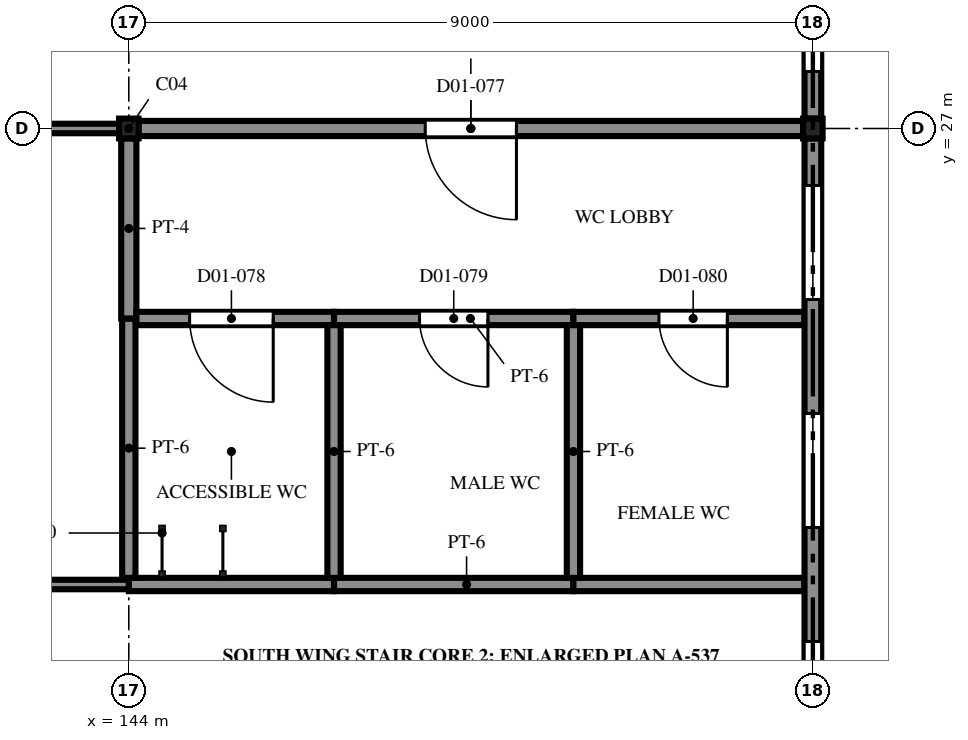
"""IFC4 building model, lengths in metres.
Left out: names, types, materials, properties, quantities, classifications, styles, units other than length and angle.
Written with IfcOpenShell. Run it as: python <this file> out.ifc"""

import sys

from ifc_helpers import new_model, si_unit, direction, frame, frame_2d, origin, origin_2d, place, context, subcontext, project, spatial, polyline, rectangle, i_section, outline, extrude, element, fill, save


model = new_model("IFC4")
c1 = context("Model", 3, precision=1e-05, world=origin(), true_north=direction((0.0, 1.0)))
c2 = subcontext(c1, "Body", "Model", "MODEL_VIEW")
j1 = project(units=[si_unit("LENGTHUNIT", "METRE"), si_unit("PLANEANGLEUNIT", "RADIAN")], contexts=[c1])
p1 = place(None, origin())
s1 = spatial("IfcSite", under=j1, at=p1, CompositionType="ELEMENT")
p2 = place(p1, origin())
s2 = spatial("IfcBuilding", under=s1, at=p2, CompositionType="ELEMENT")
p3 = place(p2, frame((0.0, 0.0, 7.5)))
s3 = spatial("IfcBuildingStorey", under=s2, at=p3, CompositionType="ELEMENT", Elevation=7.5)
for number, where, z_axis, x_axis in (
    (1, (144.0, 27.0, 0.0), (0.0, 0.0, 1.0), (1.0, 0.0, 0.0)),
    (2, (153.0, 27.0, 0.0), (0.0, 0.0, 1.0), (1.0, 0.0, 0.0)),
):
    element("IfcColumn", number, at=place(p3, frame(where, z_axis=z_axis, x_axis=x_axis)), inside=s3, PredefinedType="COLUMN", context=c2, shape_type="SweptSolid", body=[
        extrude(i_section(OverallWidth=0.256, OverallDepth=0.26, WebThickness=0.01, FlangeThickness=0.017, FilletRadius=0.013, at=origin_2d()), origin(), (0.0, 0.0, 1.0), 4.2),
    ])
p4 = place(p3, frame((153.0, 18.13, 0.0), z_axis=(0.0, 0.0, 1.0), x_axis=(0.0, 1.0, 0.0)))
e3 = element("IfcWall", 3, at=p4, inside=s3, PredefinedType="SOLIDWALL", context=c2, shape_type="SweptSolid", body=[
    extrude(rectangle(XDim=8.74, YDim=0.22, at=frame_2d((4.37, 0.0))), origin(), (0.0, 0.0, 1.0), 3.597),
])
p5 = place(p4, frame((0.62, 0.0, 0.9)))
e4 = element("IfcOpeningElement", 4, at=p5, cuts=e3, PredefinedType="OPENING", context=c2, shape_type="SweptSolid", body=[
    extrude(rectangle(XDim=1.5, YDim=2.4, at=frame_2d((0.75, 1.2))), frame((0.0, 0.12, 0.0), z_axis=(0.0, -1.0, 0.0), x_axis=(1.0, 0.0, 0.0)), (0.0, 0.0, 1.0), 0.24),
])
p6 = place(p4, frame((3.62, 0.0, 0.9)))
e5 = element("IfcOpeningElement", 5, at=p6, cuts=e3, PredefinedType="OPENING", context=c2, shape_type="SweptSolid", body=[
    extrude(rectangle(XDim=1.5, YDim=2.4, at=frame_2d((0.75, 1.2))), frame((0.0, 0.12, 0.0), z_axis=(0.0, -1.0, 0.0), x_axis=(1.0, 0.0, 0.0)), (0.0, 0.0, 1.0), 0.24),
])
p7 = place(p4, frame((6.62, 0.0, 0.9)))
e6 = element("IfcOpeningElement", 6, at=p7, cuts=e3, PredefinedType="OPENING", context=c2, shape_type="SweptSolid", body=[
    extrude(rectangle(XDim=1.5, YDim=2.4, at=frame_2d((0.75, 1.2))), frame((0.0, 0.12, 0.0), z_axis=(0.0, -1.0, 0.0), x_axis=(1.0, 0.0, 0.0)), (0.0, 0.0, 1.0), 0.24),
])
p8 = place(p3, frame((153.0, 27.13, 0.0), z_axis=(0.0, 0.0, 1.0), x_axis=(0.0, 1.0, 0.0)))
e7 = element("IfcWall", 7, at=p8, inside=s3, PredefinedType="SOLIDWALL", context=c2, shape_type="SweptSolid", body=[
    extrude(rectangle(XDim=8.616, YDim=0.22, at=frame_2d((4.308, 0.0))), origin(), (0.0, 0.0, 1.0), 3.597),
])
p9 = place(p8, frame((0.62, 0.0, 0.9)))
e8 = element("IfcOpeningElement", 8, at=p9, cuts=e7, PredefinedType="OPENING", context=c2, shape_type="SweptSolid", body=[
    extrude(rectangle(XDim=1.5, YDim=2.4, at=frame_2d((0.75, 1.2))), frame((0.0, 0.12, 0.0), z_axis=(0.0, -1.0, 0.0), x_axis=(1.0, 0.0, 0.0)), (0.0, 0.0, 1.0), 0.24),
])
p10 = place(p8, frame((3.62, 0.0, 0.9)))
e9 = element("IfcOpeningElement", 9, at=p10, cuts=e7, PredefinedType="OPENING", context=c2, shape_type="SweptSolid", body=[
    extrude(rectangle(XDim=1.5, YDim=2.4, at=frame_2d((0.75, 1.2))), frame((0.0, 0.12, 0.0), z_axis=(0.0, -1.0, 0.0), x_axis=(1.0, 0.0, 0.0)), (0.0, 0.0, 1.0), 0.24),
])
p11 = place(p8, frame((6.62, 0.0, 0.9)))
e10 = element("IfcOpeningElement", 10, at=p11, cuts=e7, PredefinedType="OPENING", context=c2, shape_type="SweptSolid", body=[
    extrude(rectangle(XDim=1.5, YDim=2.4, at=frame_2d((0.75, 1.2))), frame((0.0, 0.12, 0.0), z_axis=(0.0, -1.0, 0.0), x_axis=(1.0, 0.0, 0.0)), (0.0, 0.0, 1.0), 0.24),
])
p12 = place(p3, frame((144.0, 21.0, 0.0), z_axis=(0.0, 0.0, 1.0), x_axis=(1.0, 0.0, 0.0)))
e11 = element("IfcWall", 11, at=p12, inside=s3, PredefinedType="PARTITIONING", context=c2, shape_type="SweptSolid", body=[
    extrude(rectangle(XDim=2.7, YDim=0.175, at=frame_2d((1.35, 0.0))), origin(), (0.0, 0.0, 1.0), 3.307),
])
p13 = place(p3, frame((135.0, 21.0, 0.0), z_axis=(0.0, 0.0, 1.0), x_axis=(1.0, 0.0, 0.0)))
e12 = element("IfcWall", 12, at=p13, inside=s3, PredefinedType="PARTITIONING", context=c2, shape_type="SweptSolid", body=[
    extrude(rectangle(XDim=9.0, YDim=0.125, at=frame_2d((4.5, 0.0))), origin(), (0.0, 0.0, 1.0), 3.307),
])
p14 = place(p3, frame((146.7, 21.0, 0.0), z_axis=(0.0, 0.0, 1.0), x_axis=(1.0, 0.0, 0.0)))
e13 = element("IfcWall", 13, at=p14, inside=s3, PredefinedType="PARTITIONING", context=c2, shape_type="SweptSolid", body=[
    extrude(rectangle(XDim=3.15, YDim=0.175, at=frame_2d((1.575, 0.0))), origin(), (0.0, 0.0, 1.0), 3.307),
])
p15 = place(p3, frame((149.85, 21.0, 0.0), z_axis=(0.0, 0.0, 1.0), x_axis=(1.0, 0.0, 0.0)))
e14 = element("IfcWall", 14, at=p15, inside=s3, PredefinedType="PARTITIONING", context=c2, shape_type="SweptSolid", body=[
    extrude(rectangle(XDim=3.038, YDim=0.175, at=frame_2d((1.519, 0.0))), origin(), (0.0, 0.0, 1.0), 3.307),
])
p16 = place(p3, frame((143.872, 27.0, 0.0), z_axis=(0.0, 0.0, 1.0), x_axis=(-1.0, 0.0, 0.0)))
e15 = element("IfcWall", 15, at=p16, inside=s3, PredefinedType="PARTITIONING", context=c2, shape_type="SweptSolid", body=[
    extrude(rectangle(XDim=8.744, YDim=0.125, at=frame_2d((4.372, 0.0))), origin(), (0.0, 0.0, 1.0), 3.307),
])
p17 = place(p16, frame((3.772, 0.0, 0.0)))
e16 = element("IfcOpeningElement", 16, at=p17, cuts=e15, PredefinedType="OPENING", context=c2, shape_type="SweptSolid", body=[
    extrude(rectangle(XDim=1.2, YDim=2.1, at=frame_2d((0.6, 1.05))), frame((0.0, 0.073, 0.0), z_axis=(0.0, -1.0, 0.0), x_axis=(1.0, 0.0, 0.0)), (0.0, 0.0, 1.0), 0.145),
])
p18 = place(p3, frame((152.872, 27.0, 0.0), z_axis=(0.0, 0.0, 1.0), x_axis=(-1.0, 0.0, 0.0)))
e17 = element("IfcWall", 17, at=p18, inside=s3, PredefinedType="PARTITIONING", context=c2, shape_type="SweptSolid", body=[
    extrude(rectangle(XDim=8.744, YDim=0.2, at=frame_2d((4.372, 0.0))), origin(), (0.0, 0.0, 1.0), 3.382),
])
p19 = place(p18, frame((3.772, 0.0, 0.0)))
e18 = element("IfcOpeningElement", 18, at=p19, cuts=e17, PredefinedType="OPENING", context=c2, shape_type="SweptSolid", body=[
    extrude(rectangle(XDim=1.2, YDim=2.1, at=frame_2d((0.6, 1.05))), frame((0.0, 0.11, 0.0), z_axis=(0.0, -1.0, 0.0), x_axis=(1.0, 0.0, 0.0)), (0.0, 0.0, 1.0), 0.22),
])
p20 = place(p3, frame((144.0, 24.5, 0.0), z_axis=(0.0, 0.0, 1.0), x_axis=(0.0, -1.0, 0.0)))
e19 = element("IfcWall", 19, at=p20, inside=s3, PredefinedType="PARTITIONING", context=c2, shape_type="SweptSolid", body=[
    extrude(rectangle(XDim=3.413, YDim=0.175, at=frame_2d((1.706, 0.0))), origin(), (0.0, 0.0, 1.0), 3.307),
])
p21 = place(p3, frame((144.0, 26.87, 0.0), z_axis=(0.0, 0.0, 1.0), x_axis=(0.0, -1.0, 0.0)))
e20 = element("IfcWall", 20, at=p21, inside=s3, PredefinedType="PARTITIONING", context=c2, shape_type="SweptSolid", body=[
    extrude(rectangle(XDim=2.37, YDim=0.2, at=frame_2d((1.185, 0.0))), origin(), (0.0, 0.0, 1.0), 3.382),
])
p22 = place(p3, frame((146.7, 24.5, 0.0), z_axis=(0.0, 0.0, 1.0), x_axis=(-1.0, 0.0, 0.0)))
e21 = element("IfcWall", 21, at=p22, inside=s3, PredefinedType="PARTITIONING", context=c2, shape_type="SweptSolid", body=[
    extrude(rectangle(XDim=2.6, YDim=0.175, at=frame_2d((1.3, 0.0))), origin(), (0.0, 0.0, 1.0), 3.307),
])
p23 = place(p22, frame((0.8, 0.0, 0.0)))
e22 = element("IfcOpeningElement", 22, at=p23, cuts=e21, PredefinedType="OPENING", context=c2, shape_type="SweptSolid", body=[
    extrude(rectangle(XDim=1.1, YDim=2.1, at=frame_2d((0.55, 1.05))), frame((0.0, 0.097, 0.0), z_axis=(0.0, -1.0, 0.0), x_axis=(1.0, 0.0, 0.0)), (0.0, 0.0, 1.0), 0.195),
])
p24 = place(p3, frame((149.85, 24.5, 0.0), z_axis=(0.0, 0.0, 1.0), x_axis=(-1.0, 0.0, 0.0)))
e23 = element("IfcWall", 23, at=p24, inside=s3, PredefinedType="PARTITIONING", context=c2, shape_type="SweptSolid", body=[
    extrude(rectangle(XDim=3.15, YDim=0.175, at=frame_2d((1.575, 0.0))), origin(), (0.0, 0.0, 1.0), 3.307),
])
p25 = place(p24, frame((1.125, 0.0, 0.0)))
e24 = element("IfcOpeningElement", 24, at=p25, cuts=e23, PredefinedType="OPENING", context=c2, shape_type="SweptSolid", body=[
    extrude(rectangle(XDim=0.9, YDim=2.1, at=frame_2d((0.45, 1.05))), frame((0.0, 0.097, 0.0), z_axis=(0.0, -1.0, 0.0), x_axis=(1.0, 0.0, 0.0)), (0.0, 0.0, 1.0), 0.195),
])
p26 = place(p3, frame((152.888, 24.5, 0.0), z_axis=(0.0, 0.0, 1.0), x_axis=(-1.0, 0.0, 0.0)))
e25 = element("IfcWall", 25, at=p26, inside=s3, PredefinedType="PARTITIONING", context=c2, shape_type="SweptSolid", body=[
    extrude(rectangle(XDim=3.038, YDim=0.175, at=frame_2d((1.519, 0.0))), origin(), (0.0, 0.0, 1.0), 3.307),
])
p27 = place(p26, frame((1.013, 0.0, 0.0)))
e26 = element("IfcOpeningElement", 26, at=p27, cuts=e25, PredefinedType="OPENING", context=c2, shape_type="SweptSolid", body=[
    extrude(rectangle(XDim=0.9, YDim=2.1, at=frame_2d((0.45, 1.05))), frame((0.0, 0.097, 0.0), z_axis=(0.0, -1.0, 0.0), x_axis=(1.0, 0.0, 0.0)), (0.0, 0.0, 1.0), 0.195),
])
for number, where, z_axis, x_axis in (
    (27, (146.7, 24.413, 0.0), (0.0, 0.0, 1.0), (0.0, -1.0, 0.0)),
    (28, (149.85, 24.413, 0.0), (0.0, 0.0, 1.0), (0.0, -1.0, 0.0)),
):
    element("IfcWall", number, at=place(p3, frame(where, z_axis=z_axis, x_axis=x_axis)), inside=s3, PredefinedType="PARTITIONING", context=c2, shape_type="SweptSolid", body=[
        extrude(rectangle(XDim=3.325, YDim=0.175, at=frame_2d((1.663, 0.0))), origin(), (0.0, 0.0, 1.0), 3.307),
    ])
p28 = place(p5, origin())
e29 = element("IfcWindow", 29, at=p28, inside=s3, PartitioningType="DOUBLE_PANEL_VERTICAL", PredefinedType="WINDOW", context=c2, shape_type="SweptSolid", body=[
    extrude(outline(polyline([(0.0, 0.0), (1.5, 0.0), (1.5, 2.4), (0.0, 2.4), (0.0, 0.0)]), holes=[polyline([(0.07, 0.07), (1.43, 0.07), (1.43, 2.33), (0.07, 2.33), (0.07, 0.07)])]), frame((0.0, 0.03, 0.0), z_axis=(0.0, -1.0, 0.0), x_axis=(1.0, 0.0, 0.0)), (0.0, 0.0, 1.0), 0.06),
    extrude(rectangle(XDim=0.04, YDim=2.26, at=frame_2d((0.75, 1.2))), frame((0.0, 0.022, 0.0), z_axis=(0.0, -1.0, 0.0), x_axis=(1.0, 0.0, 0.0)), (0.0, 0.0, 1.0), 0.044),
    extrude(outline(polyline([(0.07, 0.07), (0.73, 0.07), (0.73, 2.33), (0.07, 2.33), (0.07, 0.07)]), holes=[polyline([(0.1, 0.1), (0.7, 0.1), (0.7, 2.3), (0.1, 2.3), (0.1, 0.1)])]), frame((0.0, 0.022, 0.0), z_axis=(0.0, -1.0, 0.0), x_axis=(1.0, 0.0, 0.0)), (0.0, 0.0, 1.0), 0.045),
    extrude(rectangle(XDim=0.6, YDim=2.2, at=frame_2d((0.4, 1.2))), frame((0.0, 0.006, 0.0), z_axis=(0.0, -1.0, 0.0), x_axis=(1.0, 0.0, 0.0)), (0.0, 0.0, 1.0), 0.012),
    extrude(outline(polyline([(0.77, 0.07), (1.43, 0.07), (1.43, 2.33), (0.77, 2.33), (0.77, 0.07)]), holes=[polyline([(0.8, 0.1), (1.4, 0.1), (1.4, 2.3), (0.8, 2.3), (0.8, 0.1)])]), frame((0.0, 0.022, 0.0), z_axis=(0.0, -1.0, 0.0), x_axis=(1.0, 0.0, 0.0)), (0.0, 0.0, 1.0), 0.045),
    extrude(rectangle(XDim=0.6, YDim=2.2, at=frame_2d((1.1, 1.2))), frame((0.0, 0.006, 0.0), z_axis=(0.0, -1.0, 0.0), x_axis=(1.0, 0.0, 0.0)), (0.0, 0.0, 1.0), 0.012),
])
fill(e4, e29)
p29 = place(p6, origin())
e30 = element("IfcWindow", 30, at=p29, inside=s3, PartitioningType="DOUBLE_PANEL_VERTICAL", PredefinedType="WINDOW", context=c2, shape_type="SweptSolid", body=[
    extrude(outline(polyline([(0.0, 0.0), (1.5, 0.0), (1.5, 2.4), (0.0, 2.4), (0.0, 0.0)]), holes=[polyline([(0.07, 0.07), (1.43, 0.07), (1.43, 2.33), (0.07, 2.33), (0.07, 0.07)])]), frame((0.0, 0.03, 0.0), z_axis=(0.0, -1.0, 0.0), x_axis=(1.0, 0.0, 0.0)), (0.0, 0.0, 1.0), 0.06),
    extrude(rectangle(XDim=0.04, YDim=2.26, at=frame_2d((0.75, 1.2))), frame((0.0, 0.022, 0.0), z_axis=(0.0, -1.0, 0.0), x_axis=(1.0, 0.0, 0.0)), (0.0, 0.0, 1.0), 0.044),
    extrude(outline(polyline([(0.07, 0.07), (0.73, 0.07), (0.73, 2.33), (0.07, 2.33), (0.07, 0.07)]), holes=[polyline([(0.1, 0.1), (0.7, 0.1), (0.7, 2.3), (0.1, 2.3), (0.1, 0.1)])]), frame((0.0, 0.022, 0.0), z_axis=(0.0, -1.0, 0.0), x_axis=(1.0, 0.0, 0.0)), (0.0, 0.0, 1.0), 0.045),
    extrude(rectangle(XDim=0.6, YDim=2.2, at=frame_2d((0.4, 1.2))), frame((0.0, 0.006, 0.0), z_axis=(0.0, -1.0, 0.0), x_axis=(1.0, 0.0, 0.0)), (0.0, 0.0, 1.0), 0.012),
    extrude(outline(polyline([(0.77, 0.07), (1.43, 0.07), (1.43, 2.33), (0.77, 2.33), (0.77, 0.07)]), holes=[polyline([(0.8, 0.1), (1.4, 0.1), (1.4, 2.3), (0.8, 2.3), (0.8, 0.1)])]), frame((0.0, 0.022, 0.0), z_axis=(0.0, -1.0, 0.0), x_axis=(1.0, 0.0, 0.0)), (0.0, 0.0, 1.0), 0.045),
    extrude(rectangle(XDim=0.6, YDim=2.2, at=frame_2d((1.1, 1.2))), frame((0.0, 0.006, 0.0), z_axis=(0.0, -1.0, 0.0), x_axis=(1.0, 0.0, 0.0)), (0.0, 0.0, 1.0), 0.012),
])
fill(e5, e30)
p30 = place(p7, origin())
e31 = element("IfcWindow", 31, at=p30, inside=s3, PartitioningType="DOUBLE_PANEL_VERTICAL", PredefinedType="WINDOW", context=c2, shape_type="SweptSolid", body=[
    extrude(outline(polyline([(0.0, 0.0), (1.5, 0.0), (1.5, 2.4), (0.0, 2.4), (0.0, 0.0)]), holes=[polyline([(0.07, 0.07), (1.43, 0.07), (1.43, 2.33), (0.07, 2.33), (0.07, 0.07)])]), frame((0.0, 0.03, 0.0), z_axis=(0.0, -1.0, 0.0), x_axis=(1.0, 0.0, 0.0)), (0.0, 0.0, 1.0), 0.06),
    extrude(rectangle(XDim=0.04, YDim=2.26, at=frame_2d((0.75, 1.2))), frame((0.0, 0.022, 0.0), z_axis=(0.0, -1.0, 0.0), x_axis=(1.0, 0.0, 0.0)), (0.0, 0.0, 1.0), 0.044),
    extrude(outline(polyline([(0.07, 0.07), (0.73, 0.07), (0.73, 2.33), (0.07, 2.33), (0.07, 0.07)]), holes=[polyline([(0.1, 0.1), (0.7, 0.1), (0.7, 2.3), (0.1, 2.3), (0.1, 0.1)])]), frame((0.0, 0.022, 0.0), z_axis=(0.0, -1.0, 0.0), x_axis=(1.0, 0.0, 0.0)), (0.0, 0.0, 1.0), 0.045),
    extrude(rectangle(XDim=0.6, YDim=2.2, at=frame_2d((0.4, 1.2))), frame((0.0, 0.006, 0.0), z_axis=(0.0, -1.0, 0.0), x_axis=(1.0, 0.0, 0.0)), (0.0, 0.0, 1.0), 0.012),
    extrude(outline(polyline([(0.77, 0.07), (1.43, 0.07), (1.43, 2.33), (0.77, 2.33), (0.77, 0.07)]), holes=[polyline([(0.8, 0.1), (1.4, 0.1), (1.4, 2.3), (0.8, 2.3), (0.8, 0.1)])]), frame((0.0, 0.022, 0.0), z_axis=(0.0, -1.0, 0.0), x_axis=(1.0, 0.0, 0.0)), (0.0, 0.0, 1.0), 0.045),
    extrude(rectangle(XDim=0.6, YDim=2.2, at=frame_2d((1.1, 1.2))), frame((0.0, 0.006, 0.0), z_axis=(0.0, -1.0, 0.0), x_axis=(1.0, 0.0, 0.0)), (0.0, 0.0, 1.0), 0.012),
])
fill(e6, e31)
p31 = place(p9, origin())
e32 = element("IfcWindow", 32, at=p31, inside=s3, PartitioningType="DOUBLE_PANEL_VERTICAL", PredefinedType="WINDOW", context=c2, shape_type="SweptSolid", body=[
    extrude(outline(polyline([(0.0, 0.0), (1.5, 0.0), (1.5, 2.4), (0.0, 2.4), (0.0, 0.0)]), holes=[polyline([(0.07, 0.07), (1.43, 0.07), (1.43, 2.33), (0.07, 2.33), (0.07, 0.07)])]), frame((0.0, 0.03, 0.0), z_axis=(0.0, -1.0, 0.0), x_axis=(1.0, 0.0, 0.0)), (0.0, 0.0, 1.0), 0.06),
    extrude(rectangle(XDim=0.04, YDim=2.26, at=frame_2d((0.75, 1.2))), frame((0.0, 0.022, 0.0), z_axis=(0.0, -1.0, 0.0), x_axis=(1.0, 0.0, 0.0)), (0.0, 0.0, 1.0), 0.044),
    extrude(outline(polyline([(0.07, 0.07), (0.73, 0.07), (0.73, 2.33), (0.07, 2.33), (0.07, 0.07)]), holes=[polyline([(0.1, 0.1), (0.7, 0.1), (0.7, 2.3), (0.1, 2.3), (0.1, 0.1)])]), frame((0.0, 0.022, 0.0), z_axis=(0.0, -1.0, 0.0), x_axis=(1.0, 0.0, 0.0)), (0.0, 0.0, 1.0), 0.045),
    extrude(rectangle(XDim=0.6, YDim=2.2, at=frame_2d((0.4, 1.2))), frame((0.0, 0.006, 0.0), z_axis=(0.0, -1.0, 0.0), x_axis=(1.0, 0.0, 0.0)), (0.0, 0.0, 1.0), 0.012),
    extrude(outline(polyline([(0.77, 0.07), (1.43, 0.07), (1.43, 2.33), (0.77, 2.33), (0.77, 0.07)]), holes=[polyline([(0.8, 0.1), (1.4, 0.1), (1.4, 2.3), (0.8, 2.3), (0.8, 0.1)])]), frame((0.0, 0.022, 0.0), z_axis=(0.0, -1.0, 0.0), x_axis=(1.0, 0.0, 0.0)), (0.0, 0.0, 1.0), 0.045),
    extrude(rectangle(XDim=0.6, YDim=2.2, at=frame_2d((1.1, 1.2))), frame((0.0, 0.006, 0.0), z_axis=(0.0, -1.0, 0.0), x_axis=(1.0, 0.0, 0.0)), (0.0, 0.0, 1.0), 0.012),
])
fill(e8, e32)
p32 = place(p19, origin())
e33 = element("IfcDoor", 33, at=p32, inside=s3, OperationType="DOUBLE_DOOR_SINGLE_SWING", PredefinedType="DOOR", context=c2, shape_type="SweptSolid", body=[
    extrude(outline(polyline([(0.0, 0.0), (0.07, 0.0), (0.07, 2.03), (1.13, 2.03), (1.13, 0.0), (1.2, 0.0), (1.2, 2.1), (0.0, 2.1), (0.0, 0.0)])), frame((0.0, 0.025, 0.0), z_axis=(0.0, -1.0, 0.0), x_axis=(1.0, 0.0, 0.0)), (0.0, 0.0, 1.0), 0.05),
    extrude(outline(polyline([(0.074, 0.01), (0.597, 0.01), (0.597, 2.026), (0.074, 2.026), (0.074, 0.01)]), holes=[polyline([(0.178, 0.373), (0.492, 0.373), (0.492, 1.784), (0.178, 1.784), (0.178, 0.373)])]), frame((0.0, 0.017, 0.0), z_axis=(0.0, -1.0, 0.0), x_axis=(1.0, 0.0, 0.0)), (0.0, 0.0, 1.0), 0.035),
    extrude(rectangle(XDim=0.314, YDim=1.411, at=frame_2d((0.335, 1.079))), frame((0.0, 0.009, 0.0), z_axis=(0.0, -1.0, 0.0), x_axis=(1.0, 0.0, 0.0)), (0.0, 0.0, 1.0), 0.017),
    extrude(outline(polyline([(0.603, 0.01), (1.126, 0.01), (1.126, 2.026), (0.603, 2.026), (0.603, 0.01)]), holes=[polyline([(0.708, 0.373), (1.021, 0.373), (1.021, 1.784), (0.708, 1.784), (0.708, 0.373)])]), frame((0.0, 0.017, 0.0), z_axis=(0.0, -1.0, 0.0), x_axis=(1.0, 0.0, 0.0)), (0.0, 0.0, 1.0), 0.035),
    extrude(rectangle(XDim=0.314, YDim=1.411, at=frame_2d((0.865, 1.079))), frame((0.0, 0.009, 0.0), z_axis=(0.0, -1.0, 0.0), x_axis=(1.0, 0.0, 0.0)), (0.0, 0.0, 1.0), 0.017),
])
fill(e18, e33)
p33 = place(p23, origin())
e34 = element("IfcDoor", 34, at=p33, inside=s3, OperationType="SINGLE_SWING_LEFT", PredefinedType="DOOR", context=c2, shape_type="SweptSolid", body=[
    extrude(outline(polyline([(0.0, 0.0), (0.07, 0.0), (0.07, 2.03), (1.03, 2.03), (1.03, 0.0), (1.1, 0.0), (1.1, 2.1), (0.0, 2.1), (0.0, 0.0)])), frame((0.0, 0.025, 0.0), z_axis=(0.0, -1.0, 0.0), x_axis=(1.0, 0.0, 0.0)), (0.0, 0.0, 1.0), 0.05),
    extrude(outline(polyline([(0.074, 0.01), (1.026, 0.01), (1.026, 2.026), (0.074, 2.026), (0.074, 0.01)]), holes=[polyline([(0.194, 0.16), (0.906, 0.16), (0.906, 1.01), (0.194, 1.01), (0.194, 0.16)]), polyline([(0.4, 1.16), (0.7, 1.16), (0.7, 1.76), (0.4, 1.76), (0.4, 1.16)])]), frame((0.0, 0.017, 0.0), z_axis=(0.0, -1.0, 0.0), x_axis=(1.0, 0.0, 0.0)), (0.0, 0.0, 1.0), 0.035),
    extrude(rectangle(XDim=0.712, YDim=0.85, at=frame_2d((0.55, 0.585))), frame((0.0, 0.009, 0.0), z_axis=(0.0, -1.0, 0.0), x_axis=(1.0, 0.0, 0.0)), (0.0, 0.0, 1.0), 0.017),
    extrude(rectangle(XDim=0.3, YDim=0.6, at=frame_2d((0.55, 1.46))), frame((0.0, 0.006, 0.0), z_axis=(0.0, -1.0, 0.0), x_axis=(1.0, 0.0, 0.0)), (0.0, 0.0, 1.0), 0.012),
])
fill(e22, e34)
p34 = place(p25, origin())
e35 = element("IfcDoor", 35, at=p34, inside=s3, OperationType="SINGLE_SWING_LEFT", PredefinedType="DOOR", context=c2, shape_type="SweptSolid", body=[
    extrude(outline(polyline([(0.0, 0.0), (0.07, 0.0), (0.07, 2.03), (0.83, 2.03), (0.83, 0.0), (0.9, 0.0), (0.9, 2.1), (0.0, 2.1), (0.0, 0.0)])), frame((0.0, 0.025, 0.0), z_axis=(0.0, -1.0, 0.0), x_axis=(1.0, 0.0, 0.0)), (0.0, 0.0, 1.0), 0.05),
    extrude(outline(polyline([(0.074, 0.01), (0.826, 0.01), (0.826, 2.026), (0.074, 2.026), (0.074, 0.01)]), holes=[polyline([(0.194, 0.16), (0.706, 0.16), (0.706, 1.01), (0.194, 1.01), (0.194, 0.16)]), polyline([(0.3, 1.16), (0.6, 1.16), (0.6, 1.76), (0.3, 1.76), (0.3, 1.16)])]), frame((0.0, 0.017, 0.0), z_axis=(0.0, -1.0, 0.0), x_axis=(1.0, 0.0, 0.0)), (0.0, 0.0, 1.0), 0.035),
    extrude(rectangle(XDim=0.512, YDim=0.85, at=frame_2d((0.45, 0.585))), frame((0.0, 0.009, 0.0), z_axis=(0.0, -1.0, 0.0), x_axis=(1.0, 0.0, 0.0)), (0.0, 0.0, 1.0), 0.017),
    extrude(rectangle(XDim=0.3, YDim=0.6, at=frame_2d((0.45, 1.46))), frame((0.0, 0.006, 0.0), z_axis=(0.0, -1.0, 0.0), x_axis=(1.0, 0.0, 0.0)), (0.0, 0.0, 1.0), 0.012),
])
fill(e24, e35)
p35 = place(p27, origin())
e36 = element("IfcDoor", 36, at=p35, inside=s3, OperationType="SINGLE_SWING_LEFT", PredefinedType="DOOR", context=c2, shape_type="SweptSolid", body=[
    extrude(outline(polyline([(0.0, 0.0), (0.07, 0.0), (0.07, 2.03), (0.83, 2.03), (0.83, 0.0), (0.9, 0.0), (0.9, 2.1), (0.0, 2.1), (0.0, 0.0)])), frame((0.0, 0.025, 0.0), z_axis=(0.0, -1.0, 0.0), x_axis=(1.0, 0.0, 0.0)), (0.0, 0.0, 1.0), 0.05),
    extrude(outline(polyline([(0.074, 0.01), (0.826, 0.01), (0.826, 2.026), (0.074, 2.026), (0.074, 0.01)]), holes=[polyline([(0.194, 0.16), (0.706, 0.16), (0.706, 1.01), (0.194, 1.01), (0.194, 0.16)]), polyline([(0.3, 1.16), (0.6, 1.16), (0.6, 1.76), (0.3, 1.76), (0.3, 1.16)])]), frame((0.0, 0.017, 0.0), z_axis=(0.0, -1.0, 0.0), x_axis=(1.0, 0.0, 0.0)), (0.0, 0.0, 1.0), 0.035),
    extrude(rectangle(XDim=0.512, YDim=0.85, at=frame_2d((0.45, 0.585))), frame((0.0, 0.009, 0.0), z_axis=(0.0, -1.0, 0.0), x_axis=(1.0, 0.0, 0.0)), (0.0, 0.0, 1.0), 0.017),
    extrude(rectangle(XDim=0.3, YDim=0.6, at=frame_2d((0.45, 1.46))), frame((0.0, 0.006, 0.0), z_axis=(0.0, -1.0, 0.0), x_axis=(1.0, 0.0, 0.0)), (0.0, 0.0, 1.0), 0.012),
])
fill(e26, e36)
save(model, sys.argv[1])
